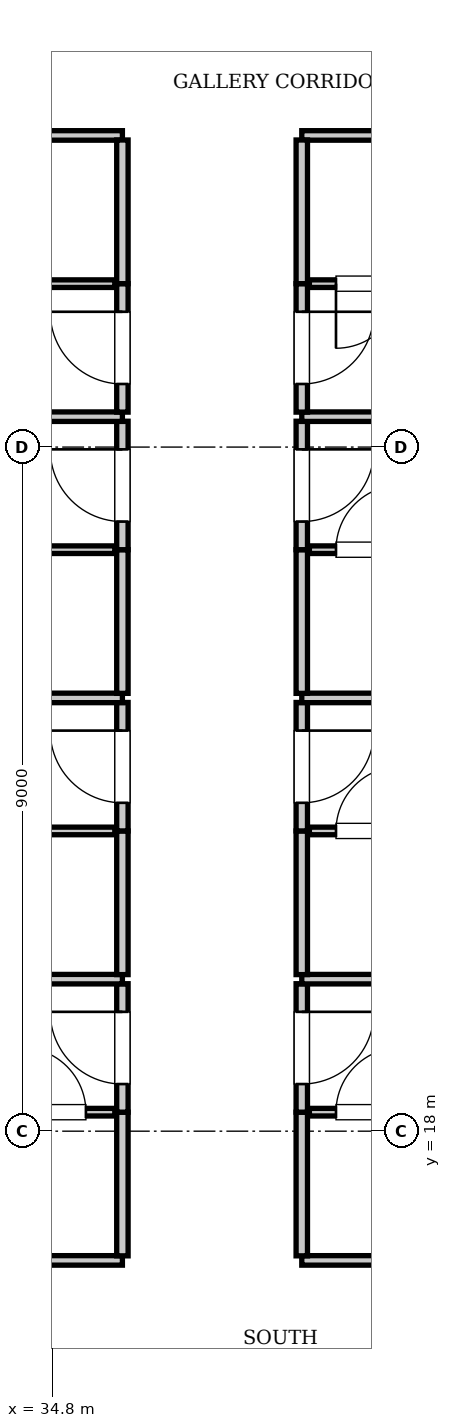
"""IFC4 building model, lengths in metres.
Left out: names, types, materials, properties, quantities, classifications, styles, units other than length and angle.
Written with IfcOpenShell. Run it as: python <this file> out.ifc"""

import sys

from ifc_helpers import new_model, si_unit, direction, frame, frame_2d, origin, place, context, subcontext, project, spatial, rectangle, extrude, element, fill, save


model = new_model("IFC4")
c1 = context("Model", 3, precision=1e-05, world=origin(), true_north=direction((0.0, 1.0)))
c2 = subcontext(c1, "Body", "Model", "MODEL_VIEW")
j1 = project(units=[si_unit("LENGTHUNIT", "METRE"), si_unit("PLANEANGLEUNIT", "RADIAN")], contexts=[c1])
p1 = place(None, origin())
s1 = spatial("IfcSite", under=j1, at=p1, CompositionType="ELEMENT")
p2 = place(p1, origin())
s2 = spatial("IfcBuilding", under=s1, at=p2, CompositionType="ELEMENT")
p3 = place(p2, frame((0.0, 0.0, 192.85)))
s3 = spatial("IfcBuildingStorey", under=s2, at=p3, CompositionType="ELEMENT", Elevation=192.85)
p4 = place(p3, frame((13.2, 16.3, 0.0), z_axis=(0.0, 0.0, 1.0), x_axis=(1.0, 0.0, 0.0)))
e1 = element("IfcWall", 1, at=p4, inside=s3, PredefinedType="PARTITIONING", context=c2, shape_type="SweptSolid", body=[
    extrude(rectangle(XDim=22.52, YDim=0.125, at=frame_2d((11.26, 0.0))), origin(), (0.0, 0.0, 1.0), 3.61),
])
p5 = place(p3, frame((38.08, 16.3, 0.0), z_axis=(0.0, 0.0, 1.0), x_axis=(1.0, 0.0, 0.0)))
e2 = element("IfcWall", 2, at=p5, inside=s3, PredefinedType="PARTITIONING", context=c2, shape_type="SweptSolid", body=[
    extrude(rectangle(XDim=24.32, YDim=0.125, at=frame_2d((12.16, 0.0))), origin(), (0.0, 0.0, 1.0), 3.61),
])
p6 = place(p3, frame((13.2, 31.1, 0.0), z_axis=(0.0, 0.0, 1.0), x_axis=(1.0, 0.0, 0.0)))
e3 = element("IfcWall", 3, at=p6, inside=s3, PredefinedType="PARTITIONING", context=c2, shape_type="SweptSolid", body=[
    extrude(rectangle(XDim=22.52, YDim=0.125, at=frame_2d((11.26, 0.0))), origin(), (0.0, 0.0, 1.0), 3.61),
])
p7 = place(p3, frame((38.08, 31.1, 0.0), z_axis=(0.0, 0.0, 1.0), x_axis=(1.0, 0.0, 0.0)))
e4 = element("IfcWall", 4, at=p7, inside=s3, PredefinedType="PARTITIONING", context=c2, shape_type="SweptSolid", body=[
    extrude(rectangle(XDim=24.32, YDim=0.125, at=frame_2d((12.16, 0.0))), origin(), (0.0, 0.0, 1.0), 3.61),
])
p8 = place(p3, frame((35.72, 16.36, 0.0), z_axis=(0.0, 0.0, 1.0), x_axis=(0.0, 1.0, 0.0)))
e5 = element("IfcWall", 5, at=p8, inside=s3, PredefinedType="PARTITIONING", context=c2, shape_type="SweptSolid", body=[
    extrude(rectangle(XDim=1.89, YDim=0.15, at=frame_2d((0.945, 0.0))), origin(), (0.0, 0.0, 1.0), 3.61),
])
p9 = place(p3, frame((35.72, 18.25, 0.0), z_axis=(0.0, 0.0, 1.0), x_axis=(0.0, 1.0, 0.0)))
e6 = element("IfcWall", 6, at=p9, inside=s3, PredefinedType="PARTITIONING", context=c2, shape_type="SweptSolid", body=[
    extrude(rectangle(XDim=1.69, YDim=0.15, at=frame_2d((0.845, 0.0))), origin(), (0.0, 0.0, 1.0), 3.61),
])
p10 = place(p9, frame((0.37, 0.0, 0.0)))
e7 = element("IfcOpeningElement", 7, at=p10, cuts=e6, PredefinedType="OPENING", context=c2, shape_type="SweptSolid", body=[
    extrude(rectangle(XDim=0.95, YDim=2.15, at=frame_2d((0.475, 1.075))), frame((0.0, 0.085, 0.0), z_axis=(0.0, -1.0, 0.0), x_axis=(1.0, 0.0, 0.0)), (0.0, 0.0, 1.0), 0.17),
])
p11 = place(p3, frame((33.32, 18.25, 0.0), z_axis=(0.0, 0.0, 1.0), x_axis=(1.0, 0.0, 0.0)))
e8 = element("IfcWall", 8, at=p11, inside=s3, PredefinedType="PARTITIONING", context=c2, shape_type="SweptSolid", body=[
    extrude(rectangle(XDim=2.3, YDim=0.1, at=frame_2d((1.15, 0.0))), origin(), (0.0, 0.0, 1.0), 3.61),
])
p12 = place(p11, frame((1.07, 0.0, 0.0)))
e9 = element("IfcOpeningElement", 9, at=p12, cuts=e8, PredefinedType="OPENING", context=c2, shape_type="SweptSolid", body=[
    extrude(rectangle(XDim=0.85, YDim=2.1, at=frame_2d((0.425, 1.05))), frame((0.0, 0.06, 0.0), z_axis=(0.0, -1.0, 0.0), x_axis=(1.0, 0.0, 0.0)), (0.0, 0.0, 1.0), 0.12),
])
p13 = place(p3, frame((38.08, 16.36, 0.0), z_axis=(0.0, 0.0, 1.0), x_axis=(0.0, 1.0, 0.0)))
e10 = element("IfcWall", 10, at=p13, inside=s3, PredefinedType="PARTITIONING", context=c2, shape_type="SweptSolid", body=[
    extrude(rectangle(XDim=1.89, YDim=0.15, at=frame_2d((0.945, 0.0))), origin(), (0.0, 0.0, 1.0), 3.61),
])
p14 = place(p3, frame((38.08, 18.25, 0.0), z_axis=(0.0, 0.0, 1.0), x_axis=(0.0, 1.0, 0.0)))
e11 = element("IfcWall", 11, at=p14, inside=s3, PredefinedType="PARTITIONING", context=c2, shape_type="SweptSolid", body=[
    extrude(rectangle(XDim=1.69, YDim=0.15, at=frame_2d((0.845, 0.0))), origin(), (0.0, 0.0, 1.0), 3.61),
])
p15 = place(p14, frame((0.37, 0.0, 0.0)))
e12 = element("IfcOpeningElement", 12, at=p15, cuts=e11, PredefinedType="OPENING", context=c2, shape_type="SweptSolid", body=[
    extrude(rectangle(XDim=0.95, YDim=2.15, at=frame_2d((0.475, 1.075))), frame((0.0, 0.085, 0.0), z_axis=(0.0, -1.0, 0.0), x_axis=(1.0, 0.0, 0.0)), (0.0, 0.0, 1.0), 0.17),
])
p16 = place(p3, frame((38.18, 18.25, 0.0), z_axis=(0.0, 0.0, 1.0), x_axis=(1.0, 0.0, 0.0)))
e13 = element("IfcWall", 13, at=p16, inside=s3, PredefinedType="PARTITIONING", context=c2, shape_type="SweptSolid", body=[
    extrude(rectangle(XDim=2.3, YDim=0.1, at=frame_2d((1.15, 0.0))), origin(), (0.0, 0.0, 1.0), 3.61),
])
p17 = place(p16, frame((0.35, 0.0, 0.0)))
e14 = element("IfcOpeningElement", 14, at=p17, cuts=e13, PredefinedType="OPENING", context=c2, shape_type="SweptSolid", body=[
    extrude(rectangle(XDim=0.85, YDim=2.1, at=frame_2d((0.425, 1.05))), frame((0.0, 0.06, 0.0), z_axis=(0.0, -1.0, 0.0), x_axis=(1.0, 0.0, 0.0)), (0.0, 0.0, 1.0), 0.12),
])
p18 = place(p3, frame((13.2, 20.0, 0.0), z_axis=(0.0, 0.0, 1.0), x_axis=(1.0, 0.0, 0.0)))
e15 = element("IfcWall", 15, at=p18, inside=s3, PredefinedType="PARTITIONING", context=c2, shape_type="SweptSolid", body=[
    extrude(rectangle(XDim=22.52, YDim=0.125, at=frame_2d((11.26, 0.0))), origin(), (0.0, 0.0, 1.0), 3.61),
])
p19 = place(p3, frame((38.08, 20.0, 0.0), z_axis=(0.0, 0.0, 1.0), x_axis=(1.0, 0.0, 0.0)))
e16 = element("IfcWall", 16, at=p19, inside=s3, PredefinedType="PARTITIONING", context=c2, shape_type="SweptSolid", body=[
    extrude(rectangle(XDim=24.32, YDim=0.125, at=frame_2d((12.16, 0.0))), origin(), (0.0, 0.0, 1.0), 3.61),
])
p20 = place(p3, frame((35.72, 20.06, 0.0), z_axis=(0.0, 0.0, 1.0), x_axis=(0.0, 1.0, 0.0)))
e17 = element("IfcWall", 17, at=p20, inside=s3, PredefinedType="PARTITIONING", context=c2, shape_type="SweptSolid", body=[
    extrude(rectangle(XDim=1.89, YDim=0.15, at=frame_2d((0.945, 0.0))), origin(), (0.0, 0.0, 1.0), 3.61),
])
p21 = place(p3, frame((35.72, 21.95, 0.0), z_axis=(0.0, 0.0, 1.0), x_axis=(0.0, 1.0, 0.0)))
e18 = element("IfcWall", 18, at=p21, inside=s3, PredefinedType="PARTITIONING", context=c2, shape_type="SweptSolid", body=[
    extrude(rectangle(XDim=1.69, YDim=0.15, at=frame_2d((0.845, 0.0))), origin(), (0.0, 0.0, 1.0), 3.61),
])
p22 = place(p21, frame((0.37, 0.0, 0.0)))
e19 = element("IfcOpeningElement", 19, at=p22, cuts=e18, PredefinedType="OPENING", context=c2, shape_type="SweptSolid", body=[
    extrude(rectangle(XDim=0.95, YDim=2.15, at=frame_2d((0.475, 1.075))), frame((0.0, 0.085, 0.0), z_axis=(0.0, -1.0, 0.0), x_axis=(1.0, 0.0, 0.0)), (0.0, 0.0, 1.0), 0.17),
])
p23 = place(p3, frame((33.32, 21.95, 0.0), z_axis=(0.0, 0.0, 1.0), x_axis=(1.0, 0.0, 0.0)))
e20 = element("IfcWall", 20, at=p23, inside=s3, PredefinedType="PARTITIONING", context=c2, shape_type="SweptSolid", body=[
    extrude(rectangle(XDim=2.3, YDim=0.1, at=frame_2d((1.15, 0.0))), origin(), (0.0, 0.0, 1.0), 3.61),
])
p24 = place(p23, frame((0.35, 0.0, 0.0)))
e21 = element("IfcOpeningElement", 21, at=p24, cuts=e20, PredefinedType="OPENING", context=c2, shape_type="SweptSolid", body=[
    extrude(rectangle(XDim=0.85, YDim=2.1, at=frame_2d((0.425, 1.05))), frame((0.0, 0.06, 0.0), z_axis=(0.0, -1.0, 0.0), x_axis=(1.0, 0.0, 0.0)), (0.0, 0.0, 1.0), 0.12),
])
p25 = place(p3, frame((38.08, 20.06, 0.0), z_axis=(0.0, 0.0, 1.0), x_axis=(0.0, 1.0, 0.0)))
e22 = element("IfcWall", 22, at=p25, inside=s3, PredefinedType="PARTITIONING", context=c2, shape_type="SweptSolid", body=[
    extrude(rectangle(XDim=1.89, YDim=0.15, at=frame_2d((0.945, 0.0))), origin(), (0.0, 0.0, 1.0), 3.61),
])
p26 = place(p3, frame((38.08, 21.95, 0.0), z_axis=(0.0, 0.0, 1.0), x_axis=(0.0, 1.0, 0.0)))
e23 = element("IfcWall", 23, at=p26, inside=s3, PredefinedType="PARTITIONING", context=c2, shape_type="SweptSolid", body=[
    extrude(rectangle(XDim=1.69, YDim=0.15, at=frame_2d((0.845, 0.0))), origin(), (0.0, 0.0, 1.0), 3.61),
])
p27 = place(p26, frame((0.37, 0.0, 0.0)))
e24 = element("IfcOpeningElement", 24, at=p27, cuts=e23, PredefinedType="OPENING", context=c2, shape_type="SweptSolid", body=[
    extrude(rectangle(XDim=0.95, YDim=2.15, at=frame_2d((0.475, 1.075))), frame((0.0, 0.085, 0.0), z_axis=(0.0, -1.0, 0.0), x_axis=(1.0, 0.0, 0.0)), (0.0, 0.0, 1.0), 0.17),
])
p28 = place(p3, frame((38.18, 21.95, 0.0), z_axis=(0.0, 0.0, 1.0), x_axis=(1.0, 0.0, 0.0)))
e25 = element("IfcWall", 25, at=p28, inside=s3, PredefinedType="PARTITIONING", context=c2, shape_type="SweptSolid", body=[
    extrude(rectangle(XDim=2.3, YDim=0.1, at=frame_2d((1.15, 0.0))), origin(), (0.0, 0.0, 1.0), 3.61),
])
p29 = place(p28, frame((0.35, 0.0, 0.0)))
e26 = element("IfcOpeningElement", 26, at=p29, cuts=e25, PredefinedType="OPENING", context=c2, shape_type="SweptSolid", body=[
    extrude(rectangle(XDim=0.85, YDim=2.1, at=frame_2d((0.425, 1.05))), frame((0.0, 0.06, 0.0), z_axis=(0.0, -1.0, 0.0), x_axis=(1.0, 0.0, 0.0)), (0.0, 0.0, 1.0), 0.12),
])
p30 = place(p3, frame((13.2, 23.7, 0.0), z_axis=(0.0, 0.0, 1.0), x_axis=(1.0, 0.0, 0.0)))
e27 = element("IfcWall", 27, at=p30, inside=s3, PredefinedType="PARTITIONING", context=c2, shape_type="SweptSolid", body=[
    extrude(rectangle(XDim=22.52, YDim=0.125, at=frame_2d((11.26, 0.0))), origin(), (0.0, 0.0, 1.0), 3.61),
])
p31 = place(p3, frame((38.08, 23.7, 0.0), z_axis=(0.0, 0.0, 1.0), x_axis=(1.0, 0.0, 0.0)))
e28 = element("IfcWall", 28, at=p31, inside=s3, PredefinedType="PARTITIONING", context=c2, shape_type="SweptSolid", body=[
    extrude(rectangle(XDim=24.32, YDim=0.125, at=frame_2d((12.16, 0.0))), origin(), (0.0, 0.0, 1.0), 3.61),
])
p32 = place(p3, frame((35.72, 23.76, 0.0), z_axis=(0.0, 0.0, 1.0), x_axis=(0.0, 1.0, 0.0)))
e29 = element("IfcWall", 29, at=p32, inside=s3, PredefinedType="PARTITIONING", context=c2, shape_type="SweptSolid", body=[
    extrude(rectangle(XDim=1.89, YDim=0.15, at=frame_2d((0.945, 0.0))), origin(), (0.0, 0.0, 1.0), 3.61),
])
p33 = place(p3, frame((35.72, 25.65, 0.0), z_axis=(0.0, 0.0, 1.0), x_axis=(0.0, 1.0, 0.0)))
e30 = element("IfcWall", 30, at=p33, inside=s3, PredefinedType="PARTITIONING", context=c2, shape_type="SweptSolid", body=[
    extrude(rectangle(XDim=1.69, YDim=0.15, at=frame_2d((0.845, 0.0))), origin(), (0.0, 0.0, 1.0), 3.61),
])
p34 = place(p33, frame((0.37, 0.0, 0.0)))
e31 = element("IfcOpeningElement", 31, at=p34, cuts=e30, PredefinedType="OPENING", context=c2, shape_type="SweptSolid", body=[
    extrude(rectangle(XDim=0.95, YDim=2.15, at=frame_2d((0.475, 1.075))), frame((0.0, 0.085, 0.0), z_axis=(0.0, -1.0, 0.0), x_axis=(1.0, 0.0, 0.0)), (0.0, 0.0, 1.0), 0.17),
])
p35 = place(p3, frame((33.32, 25.65, 0.0), z_axis=(0.0, 0.0, 1.0), x_axis=(1.0, 0.0, 0.0)))
e32 = element("IfcWall", 32, at=p35, inside=s3, PredefinedType="PARTITIONING", context=c2, shape_type="SweptSolid", body=[
    extrude(rectangle(XDim=2.3, YDim=0.1, at=frame_2d((1.15, 0.0))), origin(), (0.0, 0.0, 1.0), 3.61),
])
p36 = place(p35, frame((0.35, 0.0, 0.0)))
e33 = element("IfcOpeningElement", 33, at=p36, cuts=e32, PredefinedType="OPENING", context=c2, shape_type="SweptSolid", body=[
    extrude(rectangle(XDim=0.85, YDim=2.1, at=frame_2d((0.425, 1.05))), frame((0.0, 0.06, 0.0), z_axis=(0.0, -1.0, 0.0), x_axis=(1.0, 0.0, 0.0)), (0.0, 0.0, 1.0), 0.12),
])
p37 = place(p3, frame((38.08, 23.76, 0.0), z_axis=(0.0, 0.0, 1.0), x_axis=(0.0, 1.0, 0.0)))
e34 = element("IfcWall", 34, at=p37, inside=s3, PredefinedType="PARTITIONING", context=c2, shape_type="SweptSolid", body=[
    extrude(rectangle(XDim=1.89, YDim=0.15, at=frame_2d((0.945, 0.0))), origin(), (0.0, 0.0, 1.0), 3.61),
])
p38 = place(p3, frame((38.08, 25.65, 0.0), z_axis=(0.0, 0.0, 1.0), x_axis=(0.0, 1.0, 0.0)))
e35 = element("IfcWall", 35, at=p38, inside=s3, PredefinedType="PARTITIONING", context=c2, shape_type="SweptSolid", body=[
    extrude(rectangle(XDim=1.69, YDim=0.15, at=frame_2d((0.845, 0.0))), origin(), (0.0, 0.0, 1.0), 3.61),
])
p39 = place(p38, frame((0.37, 0.0, 0.0)))
e36 = element("IfcOpeningElement", 36, at=p39, cuts=e35, PredefinedType="OPENING", context=c2, shape_type="SweptSolid", body=[
    extrude(rectangle(XDim=0.95, YDim=2.15, at=frame_2d((0.475, 1.075))), frame((0.0, 0.085, 0.0), z_axis=(0.0, -1.0, 0.0), x_axis=(1.0, 0.0, 0.0)), (0.0, 0.0, 1.0), 0.17),
])
p40 = place(p3, frame((38.18, 25.65, 0.0), z_axis=(0.0, 0.0, 1.0), x_axis=(1.0, 0.0, 0.0)))
e37 = element("IfcWall", 37, at=p40, inside=s3, PredefinedType="PARTITIONING", context=c2, shape_type="SweptSolid", body=[
    extrude(rectangle(XDim=2.3, YDim=0.1, at=frame_2d((1.15, 0.0))), origin(), (0.0, 0.0, 1.0), 3.61),
])
p41 = place(p40, frame((0.35, 0.0, 0.0)))
e38 = element("IfcOpeningElement", 38, at=p41, cuts=e37, PredefinedType="OPENING", context=c2, shape_type="SweptSolid", body=[
    extrude(rectangle(XDim=0.85, YDim=2.1, at=frame_2d((0.425, 1.05))), frame((0.0, 0.06, 0.0), z_axis=(0.0, -1.0, 0.0), x_axis=(1.0, 0.0, 0.0)), (0.0, 0.0, 1.0), 0.12),
])
p42 = place(p3, frame((13.2, 27.4, 0.0), z_axis=(0.0, 0.0, 1.0), x_axis=(1.0, 0.0, 0.0)))
e39 = element("IfcWall", 39, at=p42, inside=s3, PredefinedType="PARTITIONING", context=c2, shape_type="SweptSolid", body=[
    extrude(rectangle(XDim=22.52, YDim=0.125, at=frame_2d((11.26, 0.0))), origin(), (0.0, 0.0, 1.0), 3.61),
])
p43 = place(p3, frame((38.08, 27.4, 0.0), z_axis=(0.0, 0.0, 1.0), x_axis=(1.0, 0.0, 0.0)))
e40 = element("IfcWall", 40, at=p43, inside=s3, PredefinedType="PARTITIONING", context=c2, shape_type="SweptSolid", body=[
    extrude(rectangle(XDim=24.32, YDim=0.125, at=frame_2d((12.16, 0.0))), origin(), (0.0, 0.0, 1.0), 3.61),
])
p44 = place(p3, frame((35.72, 27.46, 0.0), z_axis=(0.0, 0.0, 1.0), x_axis=(0.0, 1.0, 0.0)))
e41 = element("IfcWall", 41, at=p44, inside=s3, PredefinedType="PARTITIONING", context=c2, shape_type="SweptSolid", body=[
    extrude(rectangle(XDim=1.69, YDim=0.15, at=frame_2d((0.845, 0.0))), origin(), (0.0, 0.0, 1.0), 3.61),
])
p45 = place(p44, frame((0.37, 0.0, 0.0)))
e42 = element("IfcOpeningElement", 42, at=p45, cuts=e41, PredefinedType="OPENING", context=c2, shape_type="SweptSolid", body=[
    extrude(rectangle(XDim=0.95, YDim=2.15, at=frame_2d((0.475, 1.075))), frame((0.0, 0.085, 0.0), z_axis=(0.0, -1.0, 0.0), x_axis=(1.0, 0.0, 0.0)), (0.0, 0.0, 1.0), 0.17),
])
p46 = place(p3, frame((35.72, 29.15, 0.0), z_axis=(0.0, 0.0, 1.0), x_axis=(0.0, 1.0, 0.0)))
e43 = element("IfcWall", 43, at=p46, inside=s3, PredefinedType="PARTITIONING", context=c2, shape_type="SweptSolid", body=[
    extrude(rectangle(XDim=1.89, YDim=0.15, at=frame_2d((0.945, 0.0))), origin(), (0.0, 0.0, 1.0), 3.61),
])
p47 = place(p3, frame((33.32, 29.15, 0.0), z_axis=(0.0, 0.0, 1.0), x_axis=(1.0, 0.0, 0.0)))
e44 = element("IfcWall", 44, at=p47, inside=s3, PredefinedType="PARTITIONING", context=c2, shape_type="SweptSolid", body=[
    extrude(rectangle(XDim=2.3, YDim=0.1, at=frame_2d((1.15, 0.0))), origin(), (0.0, 0.0, 1.0), 3.61),
])
p48 = place(p47, frame((0.35, 0.0, 0.0)))
e45 = element("IfcOpeningElement", 45, at=p48, cuts=e44, PredefinedType="OPENING", context=c2, shape_type="SweptSolid", body=[
    extrude(rectangle(XDim=0.85, YDim=2.1, at=frame_2d((0.425, 1.05))), frame((0.0, 0.06, 0.0), z_axis=(0.0, -1.0, 0.0), x_axis=(1.0, 0.0, 0.0)), (0.0, 0.0, 1.0), 0.12),
])
p49 = place(p3, frame((38.08, 27.46, 0.0), z_axis=(0.0, 0.0, 1.0), x_axis=(0.0, 1.0, 0.0)))
e46 = element("IfcWall", 46, at=p49, inside=s3, PredefinedType="PARTITIONING", context=c2, shape_type="SweptSolid", body=[
    extrude(rectangle(XDim=1.69, YDim=0.15, at=frame_2d((0.845, 0.0))), origin(), (0.0, 0.0, 1.0), 3.61),
])
p50 = place(p49, frame((0.37, 0.0, 0.0)))
e47 = element("IfcOpeningElement", 47, at=p50, cuts=e46, PredefinedType="OPENING", context=c2, shape_type="SweptSolid", body=[
    extrude(rectangle(XDim=0.95, YDim=2.15, at=frame_2d((0.475, 1.075))), frame((0.0, 0.085, 0.0), z_axis=(0.0, -1.0, 0.0), x_axis=(1.0, 0.0, 0.0)), (0.0, 0.0, 1.0), 0.17),
])
p51 = place(p3, frame((38.08, 29.15, 0.0), z_axis=(0.0, 0.0, 1.0), x_axis=(0.0, 1.0, 0.0)))
e48 = element("IfcWall", 48, at=p51, inside=s3, PredefinedType="PARTITIONING", context=c2, shape_type="SweptSolid", body=[
    extrude(rectangle(XDim=1.89, YDim=0.15, at=frame_2d((0.945, 0.0))), origin(), (0.0, 0.0, 1.0), 3.61),
])
p52 = place(p3, frame((38.18, 29.15, 0.0), z_axis=(0.0, 0.0, 1.0), x_axis=(1.0, 0.0, 0.0)))
e49 = element("IfcWall", 49, at=p52, inside=s3, PredefinedType="PARTITIONING", context=c2, shape_type="SweptSolid", body=[
    extrude(rectangle(XDim=2.3, YDim=0.1, at=frame_2d((1.15, 0.0))), origin(), (0.0, 0.0, 1.0), 3.61),
])
p53 = place(p52, frame((0.35, 0.0, 0.0)))
e50 = element("IfcOpeningElement", 50, at=p53, cuts=e49, PredefinedType="OPENING", context=c2, shape_type="SweptSolid", body=[
    extrude(rectangle(XDim=0.85, YDim=2.1, at=frame_2d((0.425, 1.05))), frame((0.0, 0.06, 0.0), z_axis=(0.0, -1.0, 0.0), x_axis=(1.0, 0.0, 0.0)), (0.0, 0.0, 1.0), 0.12),
])
p54 = place(p12, origin())
e51 = element("IfcDoor", 51, at=p54, inside=s3, OperationType="SINGLE_SWING_LEFT", PredefinedType="DOOR", context=c2, shape_type="SweptSolid", body=[
    extrude(rectangle(XDim=0.85, YDim=2.1, at=frame_2d((0.425, 1.05))), frame((0.0, 0.025, 0.0), z_axis=(0.0, -1.0, 0.0), x_axis=(1.0, 0.0, 0.0)), (0.0, 0.0, 1.0), 0.05),
])
fill(e9, e51)
p55 = place(p10, origin())
e52 = element("IfcDoor", 52, at=p55, inside=s3, OperationType="SINGLE_SWING_RIGHT", PredefinedType="DOOR", context=c2, shape_type="SweptSolid", body=[
    extrude(rectangle(XDim=0.95, YDim=2.15, at=frame_2d((0.475, 1.075))), frame((0.0, 0.025, 0.0), z_axis=(0.0, -1.0, 0.0), x_axis=(1.0, 0.0, 0.0)), (0.0, 0.0, 1.0), 0.05),
])
fill(e7, e52)
p56 = place(p17, origin())
e53 = element("IfcDoor", 53, at=p56, inside=s3, OperationType="SINGLE_SWING_RIGHT", PredefinedType="DOOR", context=c2, shape_type="SweptSolid", body=[
    extrude(rectangle(XDim=0.85, YDim=2.1, at=frame_2d((0.425, 1.05))), frame((0.0, 0.025, 0.0), z_axis=(0.0, -1.0, 0.0), x_axis=(1.0, 0.0, 0.0)), (0.0, 0.0, 1.0), 0.05),
])
fill(e14, e53)
p57 = place(p15, frame((0.95, 0.0, 0.0), z_axis=(0.0, 0.0, 1.0), x_axis=(-1.0, 0.0, 0.0)))
e54 = element("IfcDoor", 54, at=p57, inside=s3, OperationType="SINGLE_SWING_LEFT", PredefinedType="DOOR", context=c2, shape_type="SweptSolid", body=[
    extrude(rectangle(XDim=0.95, YDim=2.15, at=frame_2d((0.475, 1.075))), frame((0.0, 0.025, 0.0), z_axis=(0.0, -1.0, 0.0), x_axis=(1.0, 0.0, 0.0)), (0.0, 0.0, 1.0), 0.05),
])
fill(e12, e54)
p58 = place(p22, origin())
e55 = element("IfcDoor", 55, at=p58, inside=s3, OperationType="SINGLE_SWING_RIGHT", PredefinedType="DOOR", context=c2, shape_type="SweptSolid", body=[
    extrude(rectangle(XDim=0.95, YDim=2.15, at=frame_2d((0.475, 1.075))), frame((0.0, 0.025, 0.0), z_axis=(0.0, -1.0, 0.0), x_axis=(1.0, 0.0, 0.0)), (0.0, 0.0, 1.0), 0.05),
])
fill(e19, e55)
p59 = place(p29, origin())
e56 = element("IfcDoor", 56, at=p59, inside=s3, OperationType="SINGLE_SWING_RIGHT", PredefinedType="DOOR", context=c2, shape_type="SweptSolid", body=[
    extrude(rectangle(XDim=0.85, YDim=2.1, at=frame_2d((0.425, 1.05))), frame((0.0, 0.025, 0.0), z_axis=(0.0, -1.0, 0.0), x_axis=(1.0, 0.0, 0.0)), (0.0, 0.0, 1.0), 0.05),
])
fill(e26, e56)
p60 = place(p27, frame((0.95, 0.0, 0.0), z_axis=(0.0, 0.0, 1.0), x_axis=(-1.0, 0.0, 0.0)))
e57 = element("IfcDoor", 57, at=p60, inside=s3, OperationType="SINGLE_SWING_LEFT", PredefinedType="DOOR", context=c2, shape_type="SweptSolid", body=[
    extrude(rectangle(XDim=0.95, YDim=2.15, at=frame_2d((0.475, 1.075))), frame((0.0, 0.025, 0.0), z_axis=(0.0, -1.0, 0.0), x_axis=(1.0, 0.0, 0.0)), (0.0, 0.0, 1.0), 0.05),
])
fill(e24, e57)
p61 = place(p34, origin())
e58 = element("IfcDoor", 58, at=p61, inside=s3, OperationType="SINGLE_SWING_RIGHT", PredefinedType="DOOR", context=c2, shape_type="SweptSolid", body=[
    extrude(rectangle(XDim=0.95, YDim=2.15, at=frame_2d((0.475, 1.075))), frame((0.0, 0.025, 0.0), z_axis=(0.0, -1.0, 0.0), x_axis=(1.0, 0.0, 0.0)), (0.0, 0.0, 1.0), 0.05),
])
fill(e31, e58)
p62 = place(p41, origin())
e59 = element("IfcDoor", 59, at=p62, inside=s3, OperationType="SINGLE_SWING_RIGHT", PredefinedType="DOOR", context=c2, shape_type="SweptSolid", body=[
    extrude(rectangle(XDim=0.85, YDim=2.1, at=frame_2d((0.425, 1.05))), frame((0.0, 0.025, 0.0), z_axis=(0.0, -1.0, 0.0), x_axis=(1.0, 0.0, 0.0)), (0.0, 0.0, 1.0), 0.05),
])
fill(e38, e59)
p63 = place(p39, frame((0.95, 0.0, 0.0), z_axis=(0.0, 0.0, 1.0), x_axis=(-1.0, 0.0, 0.0)))
e60 = element("IfcDoor", 60, at=p63, inside=s3, OperationType="SINGLE_SWING_LEFT", PredefinedType="DOOR", context=c2, shape_type="SweptSolid", body=[
    extrude(rectangle(XDim=0.95, YDim=2.15, at=frame_2d((0.475, 1.075))), frame((0.0, 0.025, 0.0), z_axis=(0.0, -1.0, 0.0), x_axis=(1.0, 0.0, 0.0)), (0.0, 0.0, 1.0), 0.05),
])
fill(e36, e60)
p64 = place(p45, origin())
e61 = element("IfcDoor", 61, at=p64, inside=s3, OperationType="SINGLE_SWING_RIGHT", PredefinedType="DOOR", context=c2, shape_type="SweptSolid", body=[
    extrude(rectangle(XDim=0.95, YDim=2.15, at=frame_2d((0.475, 1.075))), frame((0.0, 0.025, 0.0), z_axis=(0.0, -1.0, 0.0), x_axis=(1.0, 0.0, 0.0)), (0.0, 0.0, 1.0), 0.05),
])
fill(e42, e61)
p65 = place(p53, frame((0.85, 0.0, 0.0), z_axis=(0.0, 0.0, 1.0), x_axis=(-1.0, 0.0, 0.0)))
e62 = element("IfcDoor", 62, at=p65, inside=s3, OperationType="SINGLE_SWING_RIGHT", PredefinedType="DOOR", context=c2, shape_type="SweptSolid", body=[
    extrude(rectangle(XDim=0.85, YDim=2.1, at=frame_2d((0.425, 1.05))), frame((0.0, 0.025, 0.0), z_axis=(0.0, -1.0, 0.0), x_axis=(1.0, 0.0, 0.0)), (0.0, 0.0, 1.0), 0.05),
])
fill(e50, e62)
p66 = place(p50, frame((0.95, 0.0, 0.0), z_axis=(0.0, 0.0, 1.0), x_axis=(-1.0, 0.0, 0.0)))
e63 = element("IfcDoor", 63, at=p66, inside=s3, OperationType="SINGLE_SWING_LEFT", PredefinedType="DOOR", context=c2, shape_type="SweptSolid", body=[
    extrude(rectangle(XDim=0.95, YDim=2.15, at=frame_2d((0.475, 1.075))), frame((0.0, 0.025, 0.0), z_axis=(0.0, -1.0, 0.0), x_axis=(1.0, 0.0, 0.0)), (0.0, 0.0, 1.0), 0.05),
])
fill(e47, e63)
save(model, sys.argv[1])
